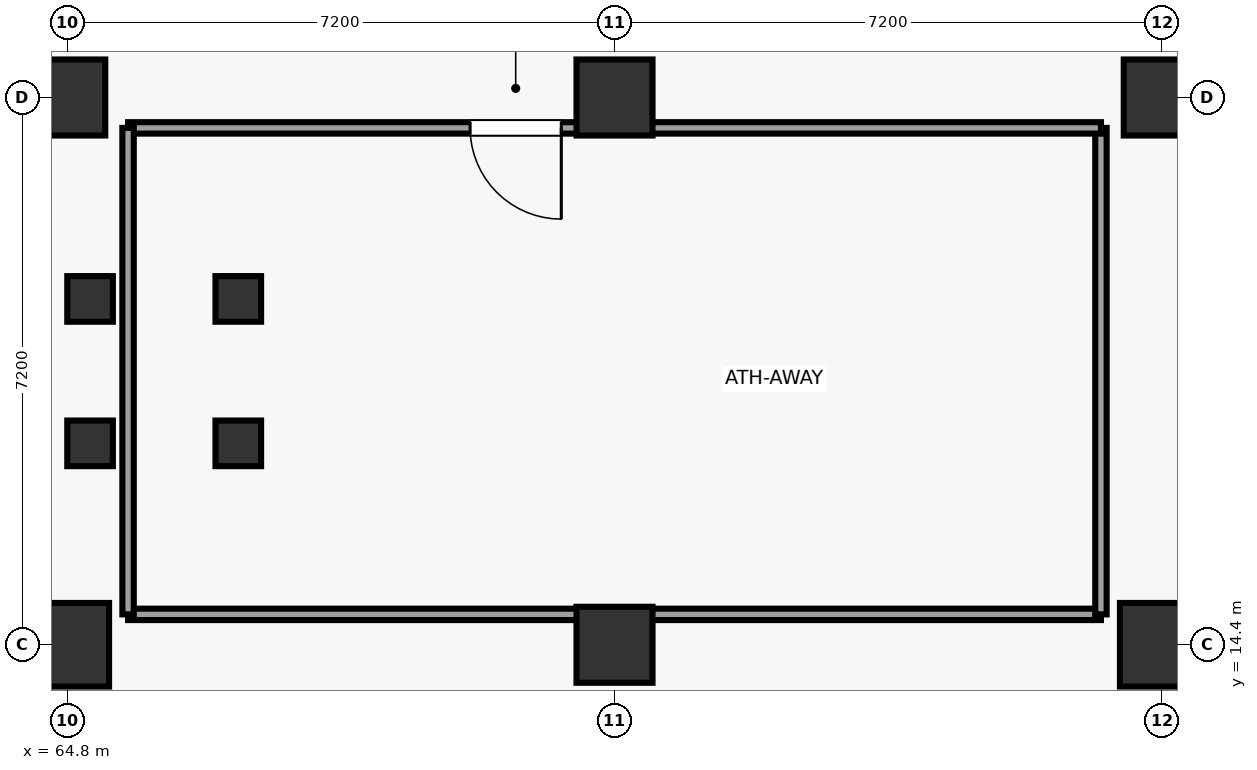
"""IFC4 building model, lengths in metres.
Left out: names, types, materials, properties, quantities, classifications, styles, units other than length and angle.
Written with IfcOpenShell. Run it as: python <this file> out.ifc"""

import sys

from ifc_helpers import new_model, si_unit, direction, frame, frame_2d, origin, origin_2d, place, context, subcontext, project, spatial, rectangle, circle, extrude, element, fill, save


model = new_model("IFC4")
c1 = context("Model", 3, precision=1e-05, world=origin(), true_north=direction((0.0, 1.0)))
c2 = subcontext(c1, "Body", "Model", "MODEL_VIEW")
j1 = project(units=[si_unit("LENGTHUNIT", "METRE"), si_unit("PLANEANGLEUNIT", "RADIAN")], contexts=[c1])
p1 = place(None, origin())
s1 = spatial("IfcSite", under=j1, at=p1, CompositionType="ELEMENT")
p2 = place(p1, origin())
s2 = spatial("IfcBuilding", under=s1, at=p2, CompositionType="ELEMENT")
p3 = place(p2, frame((0.0, 0.0, -5.4)))
s3 = spatial("IfcBuildingStorey", under=s2, at=p3, CompositionType="ELEMENT", Elevation=-5.4)
p4 = place(p3, frame((64.8, 14.4, 0.0), z_axis=(0.0, 0.0, 1.0), x_axis=(1.0, 0.0, 0.0)))
e1 = element("IfcColumn", 1, at=p4, inside=s3, PredefinedType="COLUMN", context=c2, shape_type="SweptSolid", body=[
    extrude(rectangle(XDim=1.1, YDim=1.1, at=origin_2d()), origin(), (0.0, 0.0, 1.0), 5.4),
])
p5 = place(p3, frame((64.8, 21.6, 0.0), z_axis=(0.0, 0.0, 1.0), x_axis=(1.0, 0.0, 0.0)))
e2 = element("IfcColumn", 2, at=p5, inside=s3, PredefinedType="COLUMN", context=c2, shape_type="SweptSolid", body=[
    extrude(rectangle(XDim=1.0, YDim=1.0, at=origin_2d()), origin(), (0.0, 0.0, 1.0), 5.4),
])
p6 = place(p3, frame((72.0, 14.4, 0.0), z_axis=(0.0, 0.0, 1.0), x_axis=(1.0, 0.0, 0.0)))
e3 = element("IfcColumn", 3, at=p6, inside=s3, PredefinedType="COLUMN", context=c2, shape_type="SweptSolid", body=[
    extrude(circle(Radius=0.5, at=origin_2d()), origin(), (0.0, 0.0, 1.0), 5.4),
])
p7 = place(p3, frame((72.0, 21.6, 0.0), z_axis=(0.0, 0.0, 1.0), x_axis=(1.0, 0.0, 0.0)))
e4 = element("IfcColumn", 4, at=p7, inside=s3, PredefinedType="COLUMN", context=c2, shape_type="SweptSolid", body=[
    extrude(rectangle(XDim=1.0, YDim=1.0, at=origin_2d()), origin(), (0.0, 0.0, 1.0), 5.4),
])
p8 = place(p3, frame((79.2, 14.4, 0.0), z_axis=(0.0, 0.0, 1.0), x_axis=(1.0, 0.0, 0.0)))
e5 = element("IfcColumn", 5, at=p8, inside=s3, PredefinedType="COLUMN", context=c2, shape_type="SweptSolid", body=[
    extrude(rectangle(XDim=1.1, YDim=1.1, at=origin_2d()), origin(), (0.0, 0.0, 1.0), 5.4),
])
p9 = place(p3, frame((79.2, 21.6, 0.0), z_axis=(0.0, 0.0, 1.0), x_axis=(1.0, 0.0, 0.0)))
e6 = element("IfcColumn", 6, at=p9, inside=s3, PredefinedType="COLUMN", context=c2, shape_type="SweptSolid", body=[
    extrude(rectangle(XDim=1.0, YDim=1.0, at=origin_2d()), origin(), (0.0, 0.0, 1.0), 5.4),
])
for number, where, z_axis, x_axis in (
    (7, (65.1, 17.05, 0.0), (0.0, 0.0, 1.0), (1.0, 0.0, 0.0)),
    (8, (67.05, 17.05, 0.0), (0.0, 0.0, 1.0), (1.0, 0.0, 0.0)),
    (9, (65.1, 18.95, 0.0), (0.0, 0.0, 1.0), (1.0, 0.0, 0.0)),
    (10, (67.05, 18.95, 0.0), (0.0, 0.0, 1.0), (1.0, 0.0, 0.0)),
):
    element("IfcColumn", number, at=place(p3, frame(where, z_axis=z_axis, x_axis=x_axis)), inside=s3, PredefinedType="COLUMN", context=c2, shape_type="SweptSolid", body=[
        extrude(rectangle(XDim=0.6, YDim=0.6, at=origin_2d()), origin(), (0.0, 0.0, 1.0), 5.4),
    ])
p10 = place(p3, frame((65.6, 14.8, 0.0), z_axis=(0.0, 0.0, 1.0), x_axis=(1.0, 0.0, 0.0)))
e11 = element("IfcWall", 11, at=p10, inside=s3, PredefinedType="PARTITIONING", context=c2, shape_type="SweptSolid", body=[
    extrude(rectangle(XDim=12.8, YDim=0.15, at=frame_2d((6.4, 0.0))), origin(), (0.0, 0.0, 1.0), 4.04),
])
p11 = place(p3, frame((78.4, 14.8, 0.0), z_axis=(0.0, 0.0, 1.0), x_axis=(0.0, 1.0, 0.0)))
e12 = element("IfcWall", 12, at=p11, inside=s3, PredefinedType="PARTITIONING", context=c2, shape_type="SweptSolid", body=[
    extrude(rectangle(XDim=6.4, YDim=0.15, at=frame_2d((3.2, 0.0))), origin(), (0.0, 0.0, 1.0), 4.04),
])
p12 = place(p3, frame((78.4, 21.2, 0.0), z_axis=(0.0, 0.0, 1.0), x_axis=(-1.0, 0.0, 0.0)))
e13 = element("IfcWall", 13, at=p12, inside=s3, PredefinedType="PARTITIONING", context=c2, shape_type="SweptSolid", body=[
    extrude(rectangle(XDim=12.8, YDim=0.15, at=frame_2d((6.4, 0.0))), origin(), (0.0, 0.0, 1.0), 4.04),
])
p13 = place(p12, frame((7.1, 0.0, 0.0)))
e14 = element("IfcOpeningElement", 14, at=p13, cuts=e13, PredefinedType="OPENING", context=c2, shape_type="SweptSolid", body=[
    extrude(rectangle(XDim=1.2, YDim=2.2, at=frame_2d((0.6, 1.1))), frame((0.0, 0.085, 0.0), z_axis=(0.0, -1.0, 0.0), x_axis=(1.0, 0.0, 0.0)), (0.0, 0.0, 1.0), 0.17),
])
p14 = place(p3, frame((65.6, 21.2, 0.0), z_axis=(0.0, 0.0, 1.0), x_axis=(0.0, -1.0, 0.0)))
e15 = element("IfcWall", 15, at=p14, inside=s3, PredefinedType="PARTITIONING", context=c2, shape_type="SweptSolid", body=[
    extrude(rectangle(XDim=6.4, YDim=0.15, at=frame_2d((3.2, 0.0))), origin(), (0.0, 0.0, 1.0), 4.04),
])
p15 = place(p13, origin())
e16 = element("IfcDoor", 16, at=p15, inside=s3, OperationType="SINGLE_SWING_LEFT", PredefinedType="DOOR", context=c2, shape_type="SweptSolid", body=[
    extrude(rectangle(XDim=1.2, YDim=2.2, at=frame_2d((0.6, 1.1))), frame((0.0, 0.025, 0.0), z_axis=(0.0, -1.0, 0.0), x_axis=(1.0, 0.0, 0.0)), (0.0, 0.0, 1.0), 0.05),
])
fill(e14, e16)
save(model, sys.argv[1])
